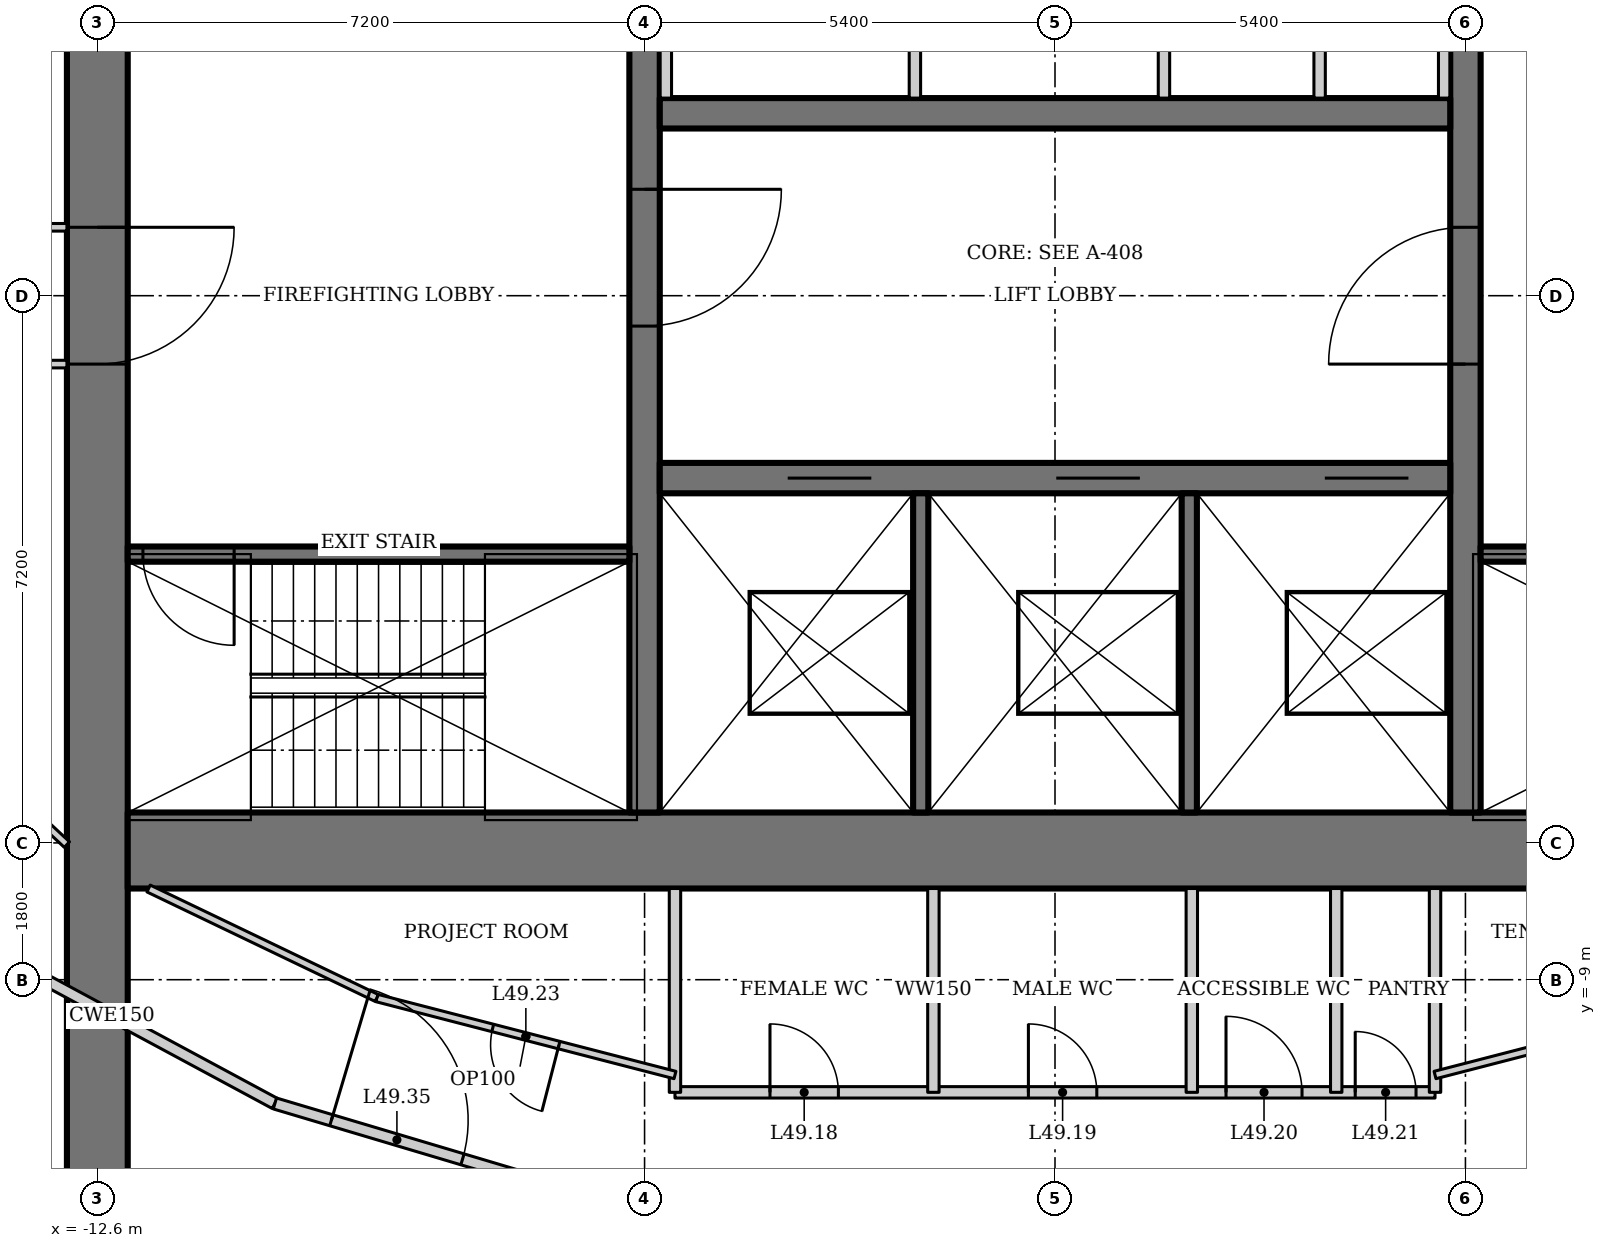
"""IFC4 building model, lengths in metres.
Left out: names, types, materials, properties, quantities, classifications, styles, units other than length and angle.
Written with IfcOpenShell. Run it as: python <this file> out.ifc"""

import sys

from ifc_helpers import new_model, si_unit, direction, frame, frame_2d, origin, place, context, subcontext, project, spatial, rectangle, extrude, element, fill, save


model = new_model("IFC4")
c1 = context("Model", 3, precision=1e-05, world=origin(), true_north=direction((0.0, 1.0)))
c2 = subcontext(c1, "Body", "Model", "MODEL_VIEW")
j1 = project(units=[si_unit("LENGTHUNIT", "METRE"), si_unit("PLANEANGLEUNIT", "RADIAN")], contexts=[c1])
p1 = place(None, origin())
s1 = spatial("IfcSite", under=j1, at=p1, CompositionType="ELEMENT")
p2 = place(p1, origin())
s2 = spatial("IfcBuilding", under=s1, at=p2, CompositionType="ELEMENT")
p3 = place(p2, frame((0.0, 0.0, 211.6)))
s3 = spatial("IfcBuildingStorey", under=s2, at=p3, CompositionType="ELEMENT", Elevation=211.6)
p4 = place(p3, frame((-12.6, 13.0, 0.0), z_axis=(0.0, 0.0, 1.0), x_axis=(0.0, -1.0, 0.0)))
e1 = element("IfcWall", 1, at=p4, inside=s3, PredefinedType="SHEAR", context=c2, shape_type="SweptSolid", body=[
    extrude(rectangle(XDim=26.0, YDim=0.8, at=frame_2d((13.0, 0.0))), origin(), (0.0, 0.0, 1.0), 4.2),
])
p5 = place(p4, frame((12.1, 0.0, 0.0)))
e2 = element("IfcOpeningElement", 2, at=p5, cuts=e1, PredefinedType="OPENING", context=c2, shape_type="SweptSolid", body=[
    extrude(rectangle(XDim=1.8, YDim=2.1, at=frame_2d((0.9, 1.05))), frame((0.0, 0.41, 0.0), z_axis=(0.0, -1.0, 0.0), x_axis=(1.0, 0.0, 0.0)), (0.0, 0.0, 1.0), 0.82),
])
p6 = place(p3, frame((-12.2, -7.3, 0.0), z_axis=(0.0, 0.0, 1.0), x_axis=(1.0, 0.0, 0.0)))
e3 = element("IfcWall", 3, at=p6, inside=s3, PredefinedType="SHEAR", context=c2, shape_type="SweptSolid", body=[
    extrude(rectangle(XDim=24.4, YDim=1.0, at=frame_2d((12.2, 0.0))), origin(), (0.0, 0.0, 1.0), 4.2),
])
p7 = place(p3, frame((5.4, -6.8, 0.0), z_axis=(0.0, 0.0, 1.0), x_axis=(0.0, 1.0, 0.0)))
e4 = element("IfcWall", 4, at=p7, inside=s3, PredefinedType="SHEAR", context=c2, shape_type="SweptSolid", body=[
    extrude(rectangle(XDim=14.6, YDim=0.4, at=frame_2d((7.3, 0.0))), origin(), (0.0, 0.0, 1.0), 4.2),
])
p8 = place(p7, frame((5.9, 0.0, 0.0)))
e5 = element("IfcOpeningElement", 5, at=p8, cuts=e4, PredefinedType="OPENING", context=c2, shape_type="SweptSolid", body=[
    extrude(rectangle(XDim=1.8, YDim=2.1, at=frame_2d((0.9, 1.05))), frame((0.0, 0.21, 0.0), z_axis=(0.0, -1.0, 0.0), x_axis=(1.0, 0.0, 0.0)), (0.0, 0.0, 1.0), 0.42),
])
p9 = place(p3, frame((-5.4, 7.8, 0.0), z_axis=(0.0, 0.0, 1.0), x_axis=(0.0, -1.0, 0.0)))
e6 = element("IfcWall", 6, at=p9, inside=s3, PredefinedType="SHEAR", context=c2, shape_type="SweptSolid", body=[
    extrude(rectangle(XDim=14.6, YDim=0.4, at=frame_2d((7.3, 0.0))), origin(), (0.0, 0.0, 1.0), 4.2),
])
p10 = place(p9, frame((6.4, 0.0, 0.0)))
e7 = element("IfcOpeningElement", 7, at=p10, cuts=e6, PredefinedType="OPENING", context=c2, shape_type="SweptSolid", body=[
    extrude(rectangle(XDim=1.8, YDim=2.1, at=frame_2d((0.9, 1.05))), frame((0.0, 0.21, 0.0), z_axis=(0.0, -1.0, 0.0), x_axis=(1.0, 0.0, 0.0)), (0.0, 0.0, 1.0), 0.42),
])
p11 = place(p3, frame((-5.2, -2.4, 0.0), z_axis=(0.0, 0.0, 1.0), x_axis=(1.0, 0.0, 0.0)))
e8 = element("IfcWall", 8, at=p11, inside=s3, PredefinedType="SHEAR", context=c2, shape_type="SweptSolid", body=[
    extrude(rectangle(XDim=10.4, YDim=0.4, at=frame_2d((5.2, 0.0))), origin(), (0.0, 0.0, 1.0), 4.2),
])
p12 = place(p11, frame((1.683, 0.0, 0.0)))
e9 = element("IfcOpeningElement", 9, at=p12, cuts=e8, PredefinedType="OPENING", context=c2, shape_type="SweptSolid", body=[
    extrude(rectangle(XDim=1.1, YDim=2.2, at=frame_2d((0.55, 1.1))), frame((0.0, 0.21, 0.0), z_axis=(0.0, -1.0, 0.0), x_axis=(1.0, 0.0, 0.0)), (0.0, 0.0, 1.0), 0.42),
])
p13 = place(p11, frame((5.217, 0.0, 0.0)))
e10 = element("IfcOpeningElement", 10, at=p13, cuts=e8, PredefinedType="OPENING", context=c2, shape_type="SweptSolid", body=[
    extrude(rectangle(XDim=1.1, YDim=2.2, at=frame_2d((0.55, 1.1))), frame((0.0, 0.21, 0.0), z_axis=(0.0, -1.0, 0.0), x_axis=(1.0, 0.0, 0.0)), (0.0, 0.0, 1.0), 0.42),
])
p14 = place(p11, frame((8.75, 0.0, 0.0)))
e11 = element("IfcOpeningElement", 11, at=p14, cuts=e8, PredefinedType="OPENING", context=c2, shape_type="SweptSolid", body=[
    extrude(rectangle(XDim=1.1, YDim=2.2, at=frame_2d((0.55, 1.1))), frame((0.0, 0.21, 0.0), z_axis=(0.0, -1.0, 0.0), x_axis=(1.0, 0.0, 0.0)), (0.0, 0.0, 1.0), 0.42),
])
for number, where, z_axis, x_axis in (
    (12, (-1.767, -2.6, 0.0), (0.0, 0.0, 1.0), (0.0, -1.0, 0.0)),
    (13, (1.767, -2.6, 0.0), (0.0, 0.0, 1.0), (0.0, -1.0, 0.0)),
):
    element("IfcWall", number, at=place(p3, frame(where, z_axis=z_axis, x_axis=x_axis)), inside=s3, PredefinedType="SOLIDWALL", context=c2, shape_type="SweptSolid", body=[
        extrude(rectangle(XDim=4.2, YDim=0.2, at=frame_2d((2.1, 0.0))), origin(), (0.0, 0.0, 1.0), 4.2),
    ])
p15 = place(p3, frame((5.2, 2.4, 0.0), z_axis=(0.0, 0.0, 1.0), x_axis=(-1.0, 0.0, 0.0)))
e14 = element("IfcWall", 14, at=p15, inside=s3, PredefinedType="SHEAR", context=c2, shape_type="SweptSolid", body=[
    extrude(rectangle(XDim=10.4, YDim=0.4, at=frame_2d((5.2, 0.0))), origin(), (0.0, 0.0, 1.0), 4.2),
])
p16 = place(p3, frame((5.6, -3.4, 0.0), z_axis=(0.0, 0.0, 1.0), x_axis=(1.0, 0.0, 0.0)))
e15 = element("IfcWall", 15, at=p16, inside=s3, PredefinedType="SHEAR", context=c2, shape_type="SweptSolid", body=[
    extrude(rectangle(XDim=6.6, YDim=0.2, at=frame_2d((3.3, 0.0))), origin(), (0.0, 0.0, 1.0), 4.2),
])
p17 = place(p16, frame((5.2, 0.0, 0.0)))
e16 = element("IfcOpeningElement", 16, at=p17, cuts=e15, PredefinedType="OPENING", context=c2, shape_type="SweptSolid", body=[
    extrude(rectangle(XDim=1.2, YDim=2.1, at=frame_2d((0.6, 1.05))), frame((0.0, 0.11, 0.0), z_axis=(0.0, -1.0, 0.0), x_axis=(1.0, 0.0, 0.0)), (0.0, 0.0, 1.0), 0.22),
])
p18 = place(p3, frame((-5.6, -3.4, 0.0), z_axis=(0.0, 0.0, 1.0), x_axis=(-1.0, 0.0, 0.0)))
e17 = element("IfcWall", 17, at=p18, inside=s3, PredefinedType="SHEAR", context=c2, shape_type="SweptSolid", body=[
    extrude(rectangle(XDim=6.6, YDim=0.2, at=frame_2d((3.3, 0.0))), origin(), (0.0, 0.0, 1.0), 4.2),
])
p19 = place(p18, frame((5.2, 0.0, 0.0)))
e18 = element("IfcOpeningElement", 18, at=p19, cuts=e17, PredefinedType="OPENING", context=c2, shape_type="SweptSolid", body=[
    extrude(rectangle(XDim=1.2, YDim=2.1, at=frame_2d((0.6, 1.05))), frame((0.0, 0.11, 0.0), z_axis=(0.0, -1.0, 0.0), x_axis=(1.0, 0.0, 0.0)), (0.0, 0.0, 1.0), 0.22),
])
p20 = place(p3, frame((-14.556, -8.318, 0.0), z_axis=(0.0, 0.0, 1.0), x_axis=(0.88053863253, -0.47397438393, 0.0)))
e19 = element("IfcWall", 19, at=p20, inside=s3, PredefinedType="PARTITIONING", context=c2, shape_type="SweptSolid", body=[
    extrude(rectangle(XDim=4.875, YDim=0.15, at=frame_2d((2.438, 0.0))), origin(), (0.0, 0.0, 1.0), 4.05),
])
p21 = place(p3, frame((-10.264, -10.628, 0.0), z_axis=(0.0, 0.0, 1.0), x_axis=(0.958384389306, -0.285480931648, 0.0)))
e20 = element("IfcWall", 20, at=p21, inside=s3, PredefinedType="PARTITIONING", context=c2, shape_type="SweptSolid", body=[
    extrude(rectangle(XDim=4.392, YDim=0.15, at=frame_2d((2.196, 0.0))), origin(), (0.0, 0.0, 1.0), 4.05),
])
p22 = place(p21, frame((0.775, 0.0, 0.0)))
e21 = element("IfcOpeningElement", 21, at=p22, cuts=e20, PredefinedType="OPENING", context=c2, shape_type="SweptSolid", body=[
    extrude(rectangle(XDim=1.8, YDim=2.1, at=frame_2d((0.9, 1.05))), frame((0.0, 0.085, 0.0), z_axis=(0.0, -1.0, 0.0), x_axis=(1.0, 0.0, 0.0)), (0.0, 0.0, 1.0), 0.17),
])
p23 = place(p3, frame((6.054, -11.882, 0.0), z_axis=(0.0, 0.0, 1.0), x_axis=(0.958384389306, 0.285480931648, 0.0)))
e22 = element("IfcWall", 22, at=p23, inside=s3, PredefinedType="PARTITIONING", context=c2, shape_type="SweptSolid", body=[
    extrude(rectangle(XDim=4.392, YDim=0.15, at=frame_2d((2.196, 0.0))), origin(), (0.0, 0.0, 1.0), 4.05),
])
for number, where, z_axis, x_axis in (
    (23, (-5.12, 2.6, 0.0), (0.0, 0.0, 1.0), (0.0, 1.0, 0.0)),
    (24, (5.12, 2.6, 0.0), (0.0, 0.0, 1.0), (0.0, 1.0, 0.0)),
    (25, (-1.843, 2.6, 0.0), (0.0, 0.0, 1.0), (0.0, 1.0, 0.0)),
):
    element("IfcWall", number, at=place(p3, frame(where, z_axis=z_axis, x_axis=x_axis)), inside=s3, PredefinedType="SOLIDWALL", context=c2, shape_type="SweptSolid", body=[
        extrude(rectangle(XDim=4.4, YDim=0.15, at=frame_2d((2.2, 0.0))), origin(), (0.0, 0.0, 1.0), 4.05),
    ])
p24 = place(p3, frame((1.434, 2.6, 0.0), z_axis=(0.0, 0.0, 1.0), x_axis=(0.0, 1.0, 0.0)))
e26 = element("IfcWall", 26, at=p24, inside=s3, PredefinedType="SOLIDWALL", context=c2, shape_type="SweptSolid", body=[
    extrude(rectangle(XDim=4.4, YDim=0.15, at=frame_2d((2.2, 0.0))), origin(), (0.0, 0.0, 1.0), 3.108),
])
p25 = place(p3, frame((3.482, 2.6, 0.0), z_axis=(0.0, 0.0, 1.0), x_axis=(0.0, 1.0, 0.0)))
e27 = element("IfcWall", 27, at=p25, inside=s3, PredefinedType="SOLIDWALL", context=c2, shape_type="SweptSolid", body=[
    extrude(rectangle(XDim=4.4, YDim=0.15, at=frame_2d((2.2, 0.0))), origin(), (0.0, 0.0, 1.0), 4.05),
])
p26 = place(p3, frame((-5.0, -10.482, 0.0), z_axis=(0.0, 0.0, 1.0), x_axis=(1.0, 0.0, 0.0)))
e28 = element("IfcWall", 28, at=p26, inside=s3, PredefinedType="SOLIDWALL", context=c2, shape_type="SweptSolid", body=[
    extrude(rectangle(XDim=10.0, YDim=0.15, at=frame_2d((5.0, 0.0))), origin(), (0.0, 0.0, 1.0), 4.05),
])
p27 = place(p26, frame((1.25, 0.0, 0.0)))
e29 = element("IfcOpeningElement", 29, at=p27, cuts=e28, PredefinedType="OPENING", context=c2, shape_type="SweptSolid", body=[
    extrude(rectangle(XDim=0.9, YDim=2.1, at=frame_2d((0.45, 1.05))), frame((0.0, 0.085, 0.0), z_axis=(0.0, -1.0, 0.0), x_axis=(1.0, 0.0, 0.0)), (0.0, 0.0, 1.0), 0.17),
])
p28 = place(p26, frame((4.65, 0.0, 0.0)))
e30 = element("IfcOpeningElement", 30, at=p28, cuts=e28, PredefinedType="OPENING", context=c2, shape_type="SweptSolid", body=[
    extrude(rectangle(XDim=0.9, YDim=2.1, at=frame_2d((0.45, 1.05))), frame((0.0, 0.085, 0.0), z_axis=(0.0, -1.0, 0.0), x_axis=(1.0, 0.0, 0.0)), (0.0, 0.0, 1.0), 0.17),
])
p29 = place(p26, frame((7.25, 0.0, 0.0)))
e31 = element("IfcOpeningElement", 31, at=p29, cuts=e28, PredefinedType="OPENING", context=c2, shape_type="SweptSolid", body=[
    extrude(rectangle(XDim=1.0, YDim=2.1, at=frame_2d((0.5, 1.05))), frame((0.0, 0.085, 0.0), z_axis=(0.0, -1.0, 0.0), x_axis=(1.0, 0.0, 0.0)), (0.0, 0.0, 1.0), 0.17),
])
p30 = place(p26, frame((8.95, 0.0, 0.0)))
e32 = element("IfcOpeningElement", 32, at=p30, cuts=e28, PredefinedType="OPENING", context=c2, shape_type="SweptSolid", body=[
    extrude(rectangle(XDim=0.8, YDim=2.1, at=frame_2d((0.4, 1.05))), frame((0.0, 0.085, 0.0), z_axis=(0.0, -1.0, 0.0), x_axis=(1.0, 0.0, 0.0)), (0.0, 0.0, 1.0), 0.17),
])
for number, where, z_axis, x_axis in (
    (33, (-5.0, -7.8, 0.0), (0.0, 0.0, 1.0), (0.0, -1.0, 0.0)),
    (34, (5.0, -7.8, 0.0), (0.0, 0.0, 1.0), (0.0, -1.0, 0.0)),
    (35, (-1.6, -7.8, 0.0), (0.0, 0.0, 1.0), (0.0, -1.0, 0.0)),
):
    element("IfcWall", number, at=place(p3, frame(where, z_axis=z_axis, x_axis=x_axis)), inside=s3, PredefinedType="SOLIDWALL", context=c2, shape_type="SweptSolid", body=[
        extrude(rectangle(XDim=2.682, YDim=0.15, at=frame_2d((1.341, 0.0))), origin(), (0.0, 0.0, 1.0), 4.05),
    ])
p31 = place(p3, frame((1.8, -7.8, 0.0), z_axis=(0.0, 0.0, 1.0), x_axis=(0.0, -1.0, 0.0)))
e36 = element("IfcWall", 36, at=p31, inside=s3, PredefinedType="SOLIDWALL", context=c2, shape_type="SweptSolid", body=[
    extrude(rectangle(XDim=2.682, YDim=0.15, at=frame_2d((1.341, 0.0))), origin(), (0.0, 0.0, 1.0), 3.293),
])
p32 = place(p3, frame((3.7, -7.8, 0.0), z_axis=(0.0, 0.0, 1.0), x_axis=(0.0, -1.0, 0.0)))
e37 = element("IfcWall", 37, at=p32, inside=s3, PredefinedType="SOLIDWALL", context=c2, shape_type="SweptSolid", body=[
    extrude(rectangle(XDim=2.682, YDim=0.15, at=frame_2d((1.341, 0.0))), origin(), (0.0, 0.0, 1.0), 4.05),
])
p33 = place(p3, frame((-13.0, -7.222, 0.0), z_axis=(0.0, 0.0, 1.0), x_axis=(-0.730651186567, 0.682750938167, 0.0)))
e38 = element("IfcWall", 38, at=p33, inside=s3, PredefinedType="PARTITIONING", context=c2, shape_type="SweptSolid", body=[
    extrude(rectangle(XDim=4.603, YDim=0.1, at=frame_2d((2.301, 0.0))), origin(), (0.0, 0.0, 1.0), 4.05),
])
p34 = place(p33, frame((1.851, 0.0, 0.0)))
e39 = element("IfcOpeningElement", 39, at=p34, cuts=e38, PredefinedType="OPENING", context=c2, shape_type="SweptSolid", body=[
    extrude(rectangle(XDim=0.9, YDim=2.1, at=frame_2d((0.45, 1.05))), frame((0.0, 0.06, 0.0), z_axis=(0.0, -1.0, 0.0), x_axis=(1.0, 0.0, 0.0)), (0.0, 0.0, 1.0), 0.12),
])
p35 = place(p3, frame((-5.0, -10.254, 0.0), z_axis=(0.0, 0.0, 1.0), x_axis=(-0.968224167198, 0.250083910027, 0.0)))
e40 = element("IfcWall", 40, at=p35, inside=s3, PredefinedType="PARTITIONING", context=c2, shape_type="SweptSolid", body=[
    extrude(rectangle(XDim=4.052, YDim=0.1, at=frame_2d((2.026, 0.0))), origin(), (0.0, 0.0, 1.0), 4.05),
])
p36 = place(p35, frame((1.576, 0.0, 0.0)))
e41 = element("IfcOpeningElement", 41, at=p36, cuts=e40, PredefinedType="OPENING", context=c2, shape_type="SweptSolid", body=[
    extrude(rectangle(XDim=0.9, YDim=2.1, at=frame_2d((0.45, 1.05))), frame((0.0, 0.06, 0.0), z_axis=(0.0, -1.0, 0.0), x_axis=(1.0, 0.0, 0.0)), (0.0, 0.0, 1.0), 0.12),
])
p37 = place(p3, frame((-8.924, -9.241, 0.0), z_axis=(0.0, 0.0, 1.0), x_axis=(-0.901553947207, 0.432666708073, 0.0)))
e42 = element("IfcWall", 42, at=p37, inside=s3, PredefinedType="PARTITIONING", context=c2, shape_type="SweptSolid", body=[
    extrude(rectangle(XDim=3.33, YDim=0.1, at=frame_2d((1.665, 0.0))), origin(), (0.0, 0.0, 1.0), 4.05),
])
p38 = place(p3, frame((8.924, -9.241, 0.0), z_axis=(0.0, 0.0, 1.0), x_axis=(-0.968224167198, -0.250083910027, 0.0)))
e43 = element("IfcWall", 43, at=p38, inside=s3, PredefinedType="PARTITIONING", context=c2, shape_type="SweptSolid", body=[
    extrude(rectangle(XDim=4.052, YDim=0.1, at=frame_2d((2.026, 0.0))), origin(), (0.0, 0.0, 1.0), 4.05),
])
p39 = place(p38, frame((1.576, 0.0, 0.0)))
e44 = element("IfcOpeningElement", 44, at=p39, cuts=e43, PredefinedType="OPENING", context=c2, shape_type="SweptSolid", body=[
    extrude(rectangle(XDim=0.9, YDim=2.1, at=frame_2d((0.45, 1.05))), frame((0.0, 0.06, 0.0), z_axis=(0.0, -1.0, 0.0), x_axis=(1.0, 0.0, 0.0)), (0.0, 0.0, 1.0), 0.12),
])
for number, where, z_axis, x_axis in (
    (45, (-15.165, -0.9, 0.0), (0.0, 0.0, 1.0), (1.0, 0.0, 0.0)),
    (46, (-13.0, 0.9, 0.0), (0.0, 0.0, 1.0), (-1.0, 0.0, 0.0)),
):
    element("IfcWall", number, at=place(p3, frame(where, z_axis=z_axis, x_axis=x_axis)), inside=s3, PredefinedType="PARTITIONING", context=c2, shape_type="SweptSolid", body=[
        extrude(rectangle(XDim=2.165, YDim=0.1, at=frame_2d((1.083, 0.0))), origin(), (0.0, 0.0, 1.0), 4.05),
    ])
p40 = place(p8, origin())
e47 = element("IfcDoor", 47, at=p40, inside=s3, OperationType="DOUBLE_DOOR_DOUBLE_SWING", PredefinedType="DOOR", context=c2, shape_type="SweptSolid", body=[
    extrude(rectangle(XDim=1.8, YDim=2.1, at=frame_2d((0.9, 1.05))), frame((0.0, 0.025, 0.0), z_axis=(0.0, -1.0, 0.0), x_axis=(1.0, 0.0, 0.0)), (0.0, 0.0, 1.0), 0.05),
])
fill(e5, e47)
p41 = place(p10, origin())
e48 = element("IfcDoor", 48, at=p41, inside=s3, OperationType="DOUBLE_DOOR_DOUBLE_SWING", PredefinedType="DOOR", context=c2, shape_type="SweptSolid", body=[
    extrude(rectangle(XDim=1.8, YDim=2.1, at=frame_2d((0.9, 1.05))), frame((0.0, 0.025, 0.0), z_axis=(0.0, -1.0, 0.0), x_axis=(1.0, 0.0, 0.0)), (0.0, 0.0, 1.0), 0.05),
])
fill(e7, e48)
p42 = place(p19, origin())
e49 = element("IfcDoor", 49, at=p42, inside=s3, OperationType="SINGLE_SWING_RIGHT", PredefinedType="DOOR", context=c2, shape_type="SweptSolid", body=[
    extrude(rectangle(XDim=1.2, YDim=2.1, at=frame_2d((0.6, 1.05))), frame((0.0, 0.025, 0.0), z_axis=(0.0, -1.0, 0.0), x_axis=(1.0, 0.0, 0.0)), (0.0, 0.0, 1.0), 0.05),
])
fill(e18, e49)
p43 = place(p5, origin())
e50 = element("IfcDoor", 50, at=p43, inside=s3, OperationType="DOUBLE_DOOR_DOUBLE_SWING", PredefinedType="DOOR", context=c2, shape_type="SweptSolid", body=[
    extrude(rectangle(XDim=1.8, YDim=2.1, at=frame_2d((0.9, 1.05))), frame((0.0, 0.025, 0.0), z_axis=(0.0, -1.0, 0.0), x_axis=(1.0, 0.0, 0.0)), (0.0, 0.0, 1.0), 0.05),
])
fill(e2, e50)
p44 = place(p12, origin())
e51 = element("IfcDoor", 51, at=p44, inside=s3, OperationType="DOUBLE_DOOR_SLIDING", PredefinedType="DOOR", context=c2, shape_type="SweptSolid", body=[
    extrude(rectangle(XDim=1.1, YDim=2.2, at=frame_2d((0.55, 1.1))), frame((0.0, 0.025, 0.0), z_axis=(0.0, -1.0, 0.0), x_axis=(1.0, 0.0, 0.0)), (0.0, 0.0, 1.0), 0.05),
])
fill(e9, e51)
p45 = place(p13, origin())
e52 = element("IfcDoor", 52, at=p45, inside=s3, OperationType="DOUBLE_DOOR_SLIDING", PredefinedType="DOOR", context=c2, shape_type="SweptSolid", body=[
    extrude(rectangle(XDim=1.1, YDim=2.2, at=frame_2d((0.55, 1.1))), frame((0.0, 0.025, 0.0), z_axis=(0.0, -1.0, 0.0), x_axis=(1.0, 0.0, 0.0)), (0.0, 0.0, 1.0), 0.05),
])
fill(e10, e52)
p46 = place(p14, origin())
e53 = element("IfcDoor", 53, at=p46, inside=s3, OperationType="DOUBLE_DOOR_SLIDING", PredefinedType="DOOR", context=c2, shape_type="SweptSolid", body=[
    extrude(rectangle(XDim=1.1, YDim=2.2, at=frame_2d((0.55, 1.1))), frame((0.0, 0.025, 0.0), z_axis=(0.0, -1.0, 0.0), x_axis=(1.0, 0.0, 0.0)), (0.0, 0.0, 1.0), 0.05),
])
fill(e11, e53)
p47 = place(p27, origin())
e54 = element("IfcDoor", 54, at=p47, inside=s3, OperationType="SINGLE_SWING_LEFT", PredefinedType="DOOR", context=c2, shape_type="SweptSolid", body=[
    extrude(rectangle(XDim=0.9, YDim=2.1, at=frame_2d((0.45, 1.05))), frame((0.0, 0.025, 0.0), z_axis=(0.0, -1.0, 0.0), x_axis=(1.0, 0.0, 0.0)), (0.0, 0.0, 1.0), 0.05),
])
fill(e29, e54)
p48 = place(p28, origin())
e55 = element("IfcDoor", 55, at=p48, inside=s3, OperationType="SINGLE_SWING_LEFT", PredefinedType="DOOR", context=c2, shape_type="SweptSolid", body=[
    extrude(rectangle(XDim=0.9, YDim=2.1, at=frame_2d((0.45, 1.05))), frame((0.0, 0.025, 0.0), z_axis=(0.0, -1.0, 0.0), x_axis=(1.0, 0.0, 0.0)), (0.0, 0.0, 1.0), 0.05),
])
fill(e30, e55)
p49 = place(p29, origin())
e56 = element("IfcDoor", 56, at=p49, inside=s3, OperationType="SINGLE_SWING_LEFT", PredefinedType="DOOR", context=c2, shape_type="SweptSolid", body=[
    extrude(rectangle(XDim=1.0, YDim=2.1, at=frame_2d((0.5, 1.05))), frame((0.0, 0.025, 0.0), z_axis=(0.0, -1.0, 0.0), x_axis=(1.0, 0.0, 0.0)), (0.0, 0.0, 1.0), 0.05),
])
fill(e31, e56)
p50 = place(p30, origin())
e57 = element("IfcDoor", 57, at=p50, inside=s3, OperationType="SINGLE_SWING_LEFT", PredefinedType="DOOR", context=c2, shape_type="SweptSolid", body=[
    extrude(rectangle(XDim=0.8, YDim=2.1, at=frame_2d((0.4, 1.05))), frame((0.0, 0.025, 0.0), z_axis=(0.0, -1.0, 0.0), x_axis=(1.0, 0.0, 0.0)), (0.0, 0.0, 1.0), 0.05),
])
fill(e32, e57)
p51 = place(p36, origin())
e58 = element("IfcDoor", 58, at=p51, inside=s3, OperationType="SINGLE_SWING_LEFT", PredefinedType="DOOR", context=c2, shape_type="SweptSolid", body=[
    extrude(rectangle(XDim=0.9, YDim=2.1, at=frame_2d((0.45, 1.05))), frame((0.0, 0.025, 0.0), z_axis=(0.0, -1.0, 0.0), x_axis=(1.0, 0.0, 0.0)), (0.0, 0.0, 1.0), 0.05),
])
fill(e41, e58)
p52 = place(p22, origin())
e59 = element("IfcDoor", 59, at=p52, inside=s3, OperationType="DOUBLE_DOOR_DOUBLE_SWING", PredefinedType="DOOR", context=c2, shape_type="SweptSolid", body=[
    extrude(rectangle(XDim=1.8, YDim=2.1, at=frame_2d((0.9, 1.05))), frame((0.0, 0.025, 0.0), z_axis=(0.0, -1.0, 0.0), x_axis=(1.0, 0.0, 0.0)), (0.0, 0.0, 1.0), 0.05),
])
fill(e21, e59)
save(model, sys.argv[1])
